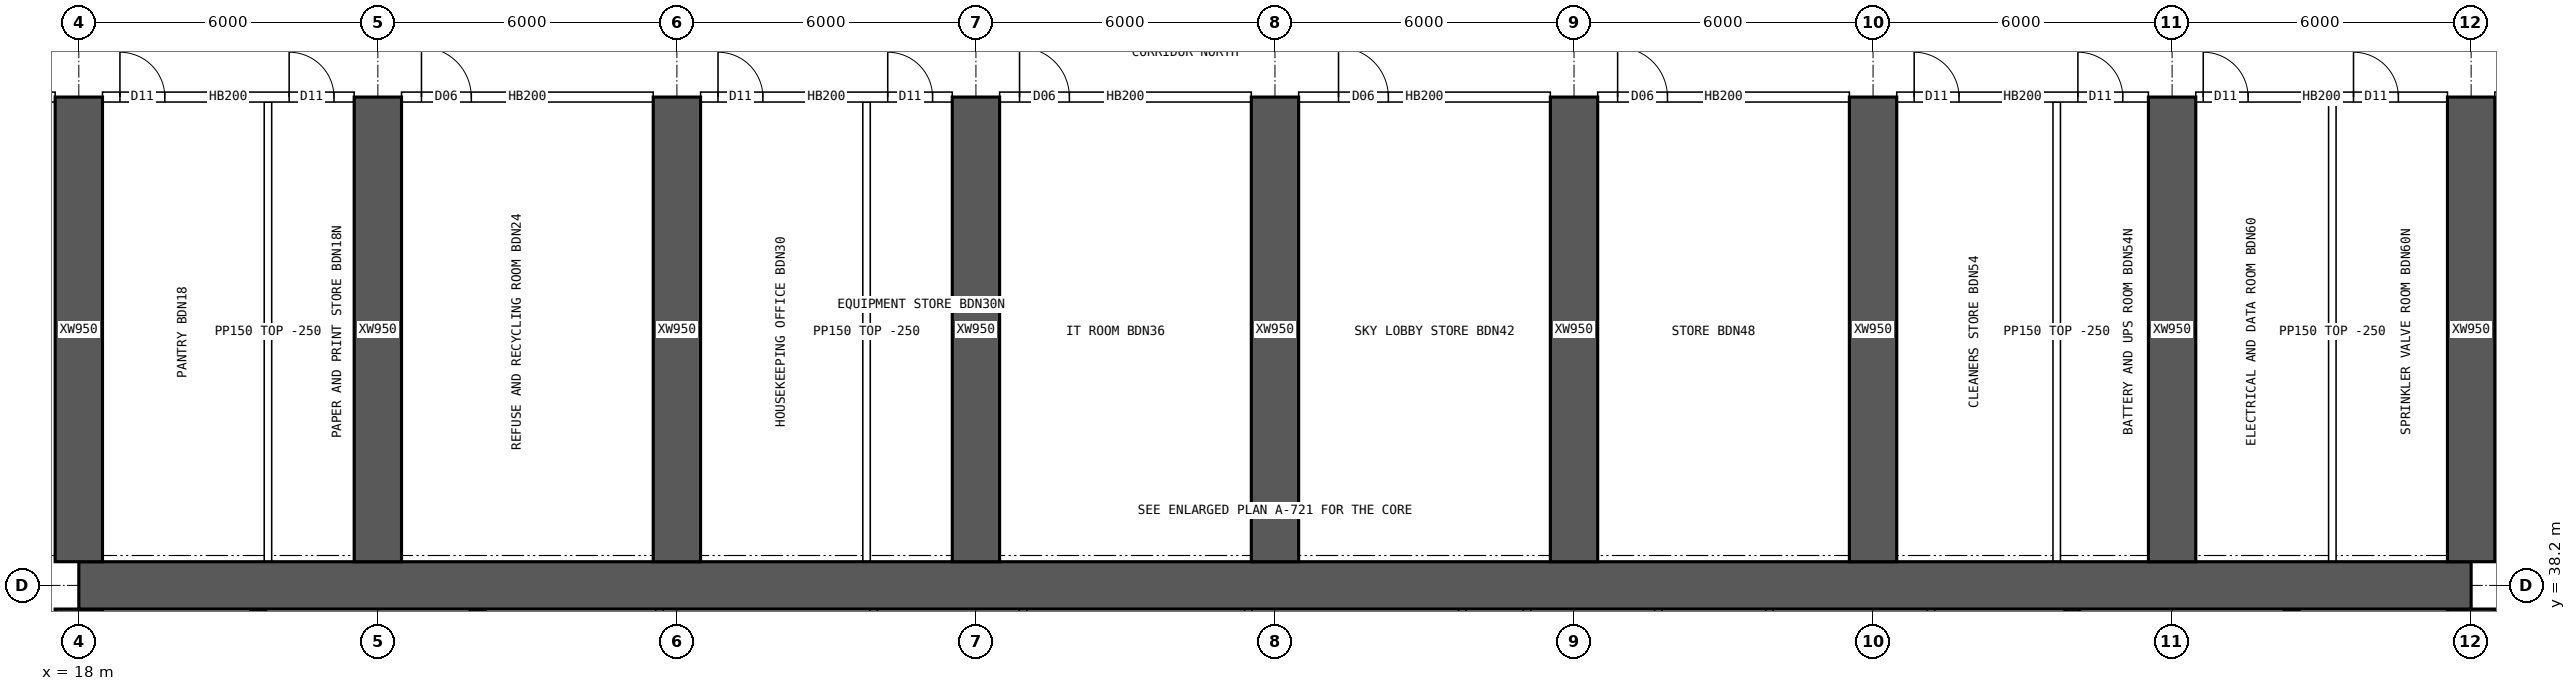
"""IFC4 building model, lengths in metres.
Left out: names, types, materials, properties, quantities, classifications, styles, units other than length and angle.
Written with IfcOpenShell. Run it as: python <this file> out.ifc"""

import sys

from ifc_helpers import new_model, si_unit, direction, frame, frame_2d, origin, place, context, subcontext, project, spatial, rectangle, extrude, element, fill, save


model = new_model("IFC4")
c1 = context("Model", 3, precision=1e-05, world=origin(), true_north=direction((0.0, 1.0)))
c2 = subcontext(c1, "Body", "Model", "MODEL_VIEW")
j1 = project(units=[si_unit("LENGTHUNIT", "METRE"), si_unit("PLANEANGLEUNIT", "RADIAN")], contexts=[c1])
p1 = place(None, origin())
s1 = spatial("IfcSite", under=j1, at=p1, CompositionType="ELEMENT")
p2 = place(p1, origin())
s2 = spatial("IfcBuilding", under=s1, at=p2, CompositionType="ELEMENT")
p3 = place(p2, frame((0.0, 0.0, 76.15)))
s3 = spatial("IfcBuildingStorey", under=s2, at=p3, CompositionType="ELEMENT", Elevation=76.15)
p4 = place(p3, frame((18.0, 38.2, 0.0), z_axis=(0.0, 0.0, 1.0), x_axis=(1.0, 0.0, 0.0)))
e1 = element("IfcWall", 1, at=p4, inside=s3, PredefinedType="SHEAR", context=c2, shape_type="SweptSolid", body=[
    extrude(rectangle(XDim=48.0, YDim=0.95, at=frame_2d((24.0, 0.0))), origin(), (0.0, 0.0, 1.0), 4.5),
])
p5 = place(p3, frame((18.0, 26.275, 0.0), z_axis=(0.0, 0.0, 1.0), x_axis=(0.0, 1.0, 0.0)))
e2 = element("IfcWall", 2, at=p5, inside=s3, PredefinedType="SHEAR", context=c2, shape_type="SweptSolid", body=[
    extrude(rectangle(XDim=11.45, YDim=0.95, at=frame_2d((5.725, 0.0))), origin(), (0.0, 0.0, 1.0), 4.5),
])
p6 = place(p5, frame((5.025, 0.0, 0.0)))
e3 = element("IfcOpeningElement", 3, at=p6, cuts=e2, PredefinedType="OPENING", context=c2, shape_type="SweptSolid", body=[
    extrude(rectangle(XDim=1.2, YDim=2.1, at=frame_2d((0.6, 1.05))), frame((0.0, 0.485, 0.0), z_axis=(0.0, -1.0, 0.0), x_axis=(1.0, 0.0, 0.0)), (0.0, 0.0, 1.0), 0.97),
])
p7 = place(p3, frame((66.0, 26.275, 0.0), z_axis=(0.0, 0.0, 1.0), x_axis=(0.0, 1.0, 0.0)))
e4 = element("IfcWall", 4, at=p7, inside=s3, PredefinedType="SHEAR", context=c2, shape_type="SweptSolid", body=[
    extrude(rectangle(XDim=11.45, YDim=0.95, at=frame_2d((5.725, 0.0))), origin(), (0.0, 0.0, 1.0), 4.5),
])
p8 = place(p7, frame((5.025, 0.0, 0.0)))
e5 = element("IfcOpeningElement", 5, at=p8, cuts=e4, PredefinedType="OPENING", context=c2, shape_type="SweptSolid", body=[
    extrude(rectangle(XDim=1.2, YDim=2.1, at=frame_2d((0.6, 1.05))), frame((0.0, 0.485, 0.0), z_axis=(0.0, -1.0, 0.0), x_axis=(1.0, 0.0, 0.0)), (0.0, 0.0, 1.0), 0.97),
])
for number, where, z_axis, x_axis in (
    (6, (21.6, 34.75, 0.0), (0.0, 0.0, 1.0), (0.0, 1.0, 0.0)),
    (7, (62.4, 34.75, 0.0), (0.0, 0.0, 1.0), (0.0, 1.0, 0.0)),
    (8, (26.0, 34.75, 0.0), (0.0, 0.0, 1.0), (0.0, 1.0, 0.0)),
    (9, (58.0, 34.75, 0.0), (0.0, 0.0, 1.0), (0.0, 1.0, 0.0)),
):
    element("IfcWall", number, at=place(p3, frame(where, z_axis=z_axis, x_axis=x_axis)), inside=s3, PredefinedType="SHEAR", context=c2, shape_type="SweptSolid", body=[
        extrude(rectangle(XDim=2.975, YDim=0.3, at=frame_2d((1.488, 0.0))), origin(), (0.0, 0.0, 1.0), 4.5),
    ])
for number, where, z_axis, x_axis in (
    (10, (18.0, 38.675, 0.0), (0.0, 0.0, 1.0), (0.0, 1.0, 0.0)),
    (11, (24.0, 38.675, 0.0), (0.0, 0.0, 1.0), (0.0, 1.0, 0.0)),
    (12, (30.0, 38.675, 0.0), (0.0, 0.0, 1.0), (0.0, 1.0, 0.0)),
    (13, (36.0, 38.675, 0.0), (0.0, 0.0, 1.0), (0.0, 1.0, 0.0)),
    (14, (42.0, 38.675, 0.0), (0.0, 0.0, 1.0), (0.0, 1.0, 0.0)),
    (15, (48.0, 38.675, 0.0), (0.0, 0.0, 1.0), (0.0, 1.0, 0.0)),
    (16, (54.0, 38.675, 0.0), (0.0, 0.0, 1.0), (0.0, 1.0, 0.0)),
    (17, (60.0, 38.675, 0.0), (0.0, 0.0, 1.0), (0.0, 1.0, 0.0)),
    (18, (66.0, 38.675, 0.0), (0.0, 0.0, 1.0), (0.0, 1.0, 0.0)),
):
    element("IfcWall", number, at=place(p3, frame(where, z_axis=z_axis, x_axis=x_axis)), inside=s3, PredefinedType="SHEAR", context=c2, shape_type="SweptSolid", body=[
        extrude(rectangle(XDim=9.325, YDim=0.95, at=frame_2d((4.663, 0.0))), origin(), (0.0, 0.0, 1.0), 4.5),
    ])
for number, where, z_axis, x_axis in (
    (19, (29.651, 34.75, 0.0), (0.0, 0.0, 1.0), (0.0, 1.0, 0.0)),
    (20, (33.946, 34.75, 0.0), (0.0, 0.0, 1.0), (0.0, 1.0, 0.0)),
    (21, (36.946, 34.75, 0.0), (0.0, 0.0, 1.0), (0.0, 1.0, 0.0)),
    (22, (41.463, 34.75, 0.0), (0.0, 0.0, 1.0), (0.0, 1.0, 0.0)),
    (23, (45.758, 34.75, 0.0), (0.0, 0.0, 1.0), (0.0, 1.0, 0.0)),
    (24, (47.058, 34.75, 0.0), (0.0, 0.0, 1.0), (0.0, 1.0, 0.0)),
    (25, (49.692, 34.75, 0.0), (0.0, 0.0, 1.0), (0.0, 1.0, 0.0)),
    (26, (51.921, 34.75, 0.0), (0.0, 0.0, 1.0), (0.0, 1.0, 0.0)),
    (27, (55.163, 34.75, 0.0), (0.0, 0.0, 1.0), (0.0, 1.0, 0.0)),
):
    element("IfcWall", number, at=place(p3, frame(where, z_axis=z_axis, x_axis=x_axis)), inside=s3, PredefinedType="SOLIDWALL", context=c2, shape_type="SweptSolid", body=[
        extrude(rectangle(XDim=2.975, YDim=0.15, at=frame_2d((1.488, 0.0))), origin(), (0.0, 0.0, 1.0), 4.25),
    ])
p9 = place(p3, frame((12.475, 48.0, 0.0), z_axis=(0.0, 0.0, 1.0), x_axis=(1.0, 0.0, 0.0)))
e28 = element("IfcWall", 28, at=p9, inside=s3, PredefinedType="SOLIDWALL", context=c2, shape_type="SweptSolid", body=[
    extrude(rectangle(XDim=5.05, YDim=0.2, at=frame_2d((2.525, 0.0))), origin(), (0.0, 0.0, 1.0), 4.25),
])
p10 = place(p9, frame((3.325, 0.0, 0.0)))
e29 = element("IfcOpeningElement", 29, at=p10, cuts=e28, PredefinedType="OPENING", context=c2, shape_type="SweptSolid", body=[
    extrude(rectangle(XDim=1.6, YDim=2.1, at=frame_2d((0.8, 1.05))), frame((0.0, 0.11, 0.0), z_axis=(0.0, -1.0, 0.0), x_axis=(1.0, 0.0, 0.0)), (0.0, 0.0, 1.0), 0.22),
])
p11 = place(p3, frame((18.475, 48.0, 0.0), z_axis=(0.0, 0.0, 1.0), x_axis=(1.0, 0.0, 0.0)))
e30 = element("IfcWall", 30, at=p11, inside=s3, PredefinedType="SOLIDWALL", context=c2, shape_type="SweptSolid", body=[
    extrude(rectangle(XDim=5.05, YDim=0.2, at=frame_2d((2.525, 0.0))), origin(), (0.0, 0.0, 1.0), 4.25),
])
p12 = place(p11, frame((0.35, 0.0, 0.0)))
e31 = element("IfcOpeningElement", 31, at=p12, cuts=e30, PredefinedType="OPENING", context=c2, shape_type="SweptSolid", body=[
    extrude(rectangle(XDim=0.9, YDim=2.1, at=frame_2d((0.45, 1.05))), frame((0.0, 0.11, 0.0), z_axis=(0.0, -1.0, 0.0), x_axis=(1.0, 0.0, 0.0)), (0.0, 0.0, 1.0), 0.22),
])
p13 = place(p11, frame((3.745, 0.0, 0.0)))
e32 = element("IfcOpeningElement", 32, at=p13, cuts=e30, PredefinedType="OPENING", context=c2, shape_type="SweptSolid", body=[
    extrude(rectangle(XDim=0.9, YDim=2.1, at=frame_2d((0.45, 1.05))), frame((0.0, 0.11, 0.0), z_axis=(0.0, -1.0, 0.0), x_axis=(1.0, 0.0, 0.0)), (0.0, 0.0, 1.0), 0.22),
])
p14 = place(p3, frame((24.475, 48.0, 0.0), z_axis=(0.0, 0.0, 1.0), x_axis=(1.0, 0.0, 0.0)))
e33 = element("IfcWall", 33, at=p14, inside=s3, PredefinedType="SOLIDWALL", context=c2, shape_type="SweptSolid", body=[
    extrude(rectangle(XDim=5.05, YDim=0.2, at=frame_2d((2.525, 0.0))), origin(), (0.0, 0.0, 1.0), 4.25),
])
p15 = place(p14, frame((0.4, 0.0, 0.0)))
e34 = element("IfcOpeningElement", 34, at=p15, cuts=e33, PredefinedType="OPENING", context=c2, shape_type="SweptSolid", body=[
    extrude(rectangle(XDim=1.0, YDim=2.1, at=frame_2d((0.5, 1.05))), frame((0.0, 0.11, 0.0), z_axis=(0.0, -1.0, 0.0), x_axis=(1.0, 0.0, 0.0)), (0.0, 0.0, 1.0), 0.22),
])
p16 = place(p3, frame((30.475, 48.0, 0.0), z_axis=(0.0, 0.0, 1.0), x_axis=(1.0, 0.0, 0.0)))
e35 = element("IfcWall", 35, at=p16, inside=s3, PredefinedType="SOLIDWALL", context=c2, shape_type="SweptSolid", body=[
    extrude(rectangle(XDim=5.05, YDim=0.2, at=frame_2d((2.525, 0.0))), origin(), (0.0, 0.0, 1.0), 4.25),
])
p17 = place(p16, frame((0.35, 0.0, 0.0)))
e36 = element("IfcOpeningElement", 36, at=p17, cuts=e35, PredefinedType="OPENING", context=c2, shape_type="SweptSolid", body=[
    extrude(rectangle(XDim=0.9, YDim=2.1, at=frame_2d((0.45, 1.05))), frame((0.0, 0.11, 0.0), z_axis=(0.0, -1.0, 0.0), x_axis=(1.0, 0.0, 0.0)), (0.0, 0.0, 1.0), 0.22),
])
p18 = place(p16, frame((3.755, 0.0, 0.0)))
e37 = element("IfcOpeningElement", 37, at=p18, cuts=e35, PredefinedType="OPENING", context=c2, shape_type="SweptSolid", body=[
    extrude(rectangle(XDim=0.9, YDim=2.1, at=frame_2d((0.45, 1.05))), frame((0.0, 0.11, 0.0), z_axis=(0.0, -1.0, 0.0), x_axis=(1.0, 0.0, 0.0)), (0.0, 0.0, 1.0), 0.22),
])
p19 = place(p3, frame((36.475, 48.0, 0.0), z_axis=(0.0, 0.0, 1.0), x_axis=(1.0, 0.0, 0.0)))
e38 = element("IfcWall", 38, at=p19, inside=s3, PredefinedType="SOLIDWALL", context=c2, shape_type="SweptSolid", body=[
    extrude(rectangle(XDim=5.05, YDim=0.2, at=frame_2d((2.525, 0.0))), origin(), (0.0, 0.0, 1.0), 4.25),
])
p20 = place(p19, frame((0.4, 0.0, 0.0)))
e39 = element("IfcOpeningElement", 39, at=p20, cuts=e38, PredefinedType="OPENING", context=c2, shape_type="SweptSolid", body=[
    extrude(rectangle(XDim=1.0, YDim=2.1, at=frame_2d((0.5, 1.05))), frame((0.0, 0.11, 0.0), z_axis=(0.0, -1.0, 0.0), x_axis=(1.0, 0.0, 0.0)), (0.0, 0.0, 1.0), 0.22),
])
p21 = place(p3, frame((42.475, 48.0, 0.0), z_axis=(0.0, 0.0, 1.0), x_axis=(1.0, 0.0, 0.0)))
e40 = element("IfcWall", 40, at=p21, inside=s3, PredefinedType="SOLIDWALL", context=c2, shape_type="SweptSolid", body=[
    extrude(rectangle(XDim=5.05, YDim=0.2, at=frame_2d((2.525, 0.0))), origin(), (0.0, 0.0, 1.0), 4.25),
])
p22 = place(p21, frame((0.8, 0.0, 0.0)))
e41 = element("IfcOpeningElement", 41, at=p22, cuts=e40, PredefinedType="OPENING", context=c2, shape_type="SweptSolid", body=[
    extrude(rectangle(XDim=1.0, YDim=2.1, at=frame_2d((0.5, 1.05))), frame((0.0, 0.11, 0.0), z_axis=(0.0, -1.0, 0.0), x_axis=(1.0, 0.0, 0.0)), (0.0, 0.0, 1.0), 0.22),
])
p23 = place(p3, frame((48.475, 48.0, 0.0), z_axis=(0.0, 0.0, 1.0), x_axis=(1.0, 0.0, 0.0)))
e42 = element("IfcWall", 42, at=p23, inside=s3, PredefinedType="SOLIDWALL", context=c2, shape_type="SweptSolid", body=[
    extrude(rectangle(XDim=5.05, YDim=0.2, at=frame_2d((2.525, 0.0))), origin(), (0.0, 0.0, 1.0), 4.25),
])
p24 = place(p23, frame((0.4, 0.0, 0.0)))
e43 = element("IfcOpeningElement", 43, at=p24, cuts=e42, PredefinedType="OPENING", context=c2, shape_type="SweptSolid", body=[
    extrude(rectangle(XDim=1.0, YDim=2.1, at=frame_2d((0.5, 1.05))), frame((0.0, 0.11, 0.0), z_axis=(0.0, -1.0, 0.0), x_axis=(1.0, 0.0, 0.0)), (0.0, 0.0, 1.0), 0.22),
])
p25 = place(p3, frame((54.475, 48.0, 0.0), z_axis=(0.0, 0.0, 1.0), x_axis=(1.0, 0.0, 0.0)))
e44 = element("IfcWall", 44, at=p25, inside=s3, PredefinedType="SOLIDWALL", context=c2, shape_type="SweptSolid", body=[
    extrude(rectangle(XDim=5.05, YDim=0.2, at=frame_2d((2.525, 0.0))), origin(), (0.0, 0.0, 1.0), 4.25),
])
p26 = place(p25, frame((0.35, 0.0, 0.0)))
e45 = element("IfcOpeningElement", 45, at=p26, cuts=e44, PredefinedType="OPENING", context=c2, shape_type="SweptSolid", body=[
    extrude(rectangle(XDim=0.9, YDim=2.1, at=frame_2d((0.45, 1.05))), frame((0.0, 0.11, 0.0), z_axis=(0.0, -1.0, 0.0), x_axis=(1.0, 0.0, 0.0)), (0.0, 0.0, 1.0), 0.22),
])
p27 = place(p25, frame((3.635, 0.0, 0.0)))
e46 = element("IfcOpeningElement", 46, at=p27, cuts=e44, PredefinedType="OPENING", context=c2, shape_type="SweptSolid", body=[
    extrude(rectangle(XDim=0.9, YDim=2.1, at=frame_2d((0.45, 1.05))), frame((0.0, 0.11, 0.0), z_axis=(0.0, -1.0, 0.0), x_axis=(1.0, 0.0, 0.0)), (0.0, 0.0, 1.0), 0.22),
])
p28 = place(p3, frame((60.475, 48.0, 0.0), z_axis=(0.0, 0.0, 1.0), x_axis=(1.0, 0.0, 0.0)))
e47 = element("IfcWall", 47, at=p28, inside=s3, PredefinedType="SOLIDWALL", context=c2, shape_type="SweptSolid", body=[
    extrude(rectangle(XDim=5.05, YDim=0.2, at=frame_2d((2.525, 0.0))), origin(), (0.0, 0.0, 1.0), 4.25),
])
p29 = place(p28, frame((0.15, 0.0, 0.0)))
e48 = element("IfcOpeningElement", 48, at=p29, cuts=e47, PredefinedType="OPENING", context=c2, shape_type="SweptSolid", body=[
    extrude(rectangle(XDim=0.9, YDim=2.1, at=frame_2d((0.45, 1.05))), frame((0.0, 0.11, 0.0), z_axis=(0.0, -1.0, 0.0), x_axis=(1.0, 0.0, 0.0)), (0.0, 0.0, 1.0), 0.22),
])
p30 = place(p28, frame((3.165, 0.0, 0.0)))
e49 = element("IfcOpeningElement", 49, at=p30, cuts=e47, PredefinedType="OPENING", context=c2, shape_type="SweptSolid", body=[
    extrude(rectangle(XDim=0.9, YDim=2.1, at=frame_2d((0.45, 1.05))), frame((0.0, 0.11, 0.0), z_axis=(0.0, -1.0, 0.0), x_axis=(1.0, 0.0, 0.0)), (0.0, 0.0, 1.0), 0.22),
])
p31 = place(p3, frame((66.475, 48.0, 0.0), z_axis=(0.0, 0.0, 1.0), x_axis=(1.0, 0.0, 0.0)))
e50 = element("IfcWall", 50, at=p31, inside=s3, PredefinedType="SOLIDWALL", context=c2, shape_type="SweptSolid", body=[
    extrude(rectangle(XDim=1.925, YDim=0.2, at=frame_2d((0.962, 0.0))), origin(), (0.0, 0.0, 1.0), 4.25),
])
p32 = place(p31, frame((0.05, 0.0, 0.0)))
e51 = element("IfcOpeningElement", 51, at=p32, cuts=e50, PredefinedType="OPENING", context=c2, shape_type="SweptSolid", body=[
    extrude(rectangle(XDim=1.2, YDim=2.1, at=frame_2d((0.6, 1.05))), frame((0.0, 0.11, 0.0), z_axis=(0.0, -1.0, 0.0), x_axis=(1.0, 0.0, 0.0)), (0.0, 0.0, 1.0), 0.22),
])
for number, where, z_axis, x_axis in (
    (52, (21.795, 38.675, 0.0), (0.0, 0.0, 1.0), (0.0, 1.0, 0.0)),
    (53, (33.805, 38.675, 0.0), (0.0, 0.0, 1.0), (0.0, 1.0, 0.0)),
    (54, (57.685, 38.675, 0.0), (0.0, 0.0, 1.0), (0.0, 1.0, 0.0)),
    (55, (63.215, 38.675, 0.0), (0.0, 0.0, 1.0), (0.0, 1.0, 0.0)),
):
    element("IfcWall", number, at=place(p3, frame(where, z_axis=z_axis, x_axis=x_axis)), inside=s3, PredefinedType="PARTITIONING", context=c2, shape_type="SweptSolid", body=[
        extrude(rectangle(XDim=9.225, YDim=0.15, at=frame_2d((4.612, 0.0))), origin(), (0.0, 0.0, 1.0), 4.25),
    ])
p33 = place(p12, origin())
e56 = element("IfcDoor", 56, at=p33, inside=s3, OperationType="SINGLE_SWING_LEFT", PredefinedType="DOOR", context=c2, shape_type="SweptSolid", body=[
    extrude(rectangle(XDim=0.9, YDim=2.1, at=frame_2d((0.45, 1.05))), frame((0.0, 0.025, 0.0), z_axis=(0.0, -1.0, 0.0), x_axis=(1.0, 0.0, 0.0)), (0.0, 0.0, 1.0), 0.05),
])
fill(e31, e56)
p34 = place(p13, origin())
e57 = element("IfcDoor", 57, at=p34, inside=s3, OperationType="SINGLE_SWING_LEFT", PredefinedType="DOOR", context=c2, shape_type="SweptSolid", body=[
    extrude(rectangle(XDim=0.9, YDim=2.1, at=frame_2d((0.45, 1.05))), frame((0.0, 0.025, 0.0), z_axis=(0.0, -1.0, 0.0), x_axis=(1.0, 0.0, 0.0)), (0.0, 0.0, 1.0), 0.05),
])
fill(e32, e57)
p35 = place(p15, origin())
e58 = element("IfcDoor", 58, at=p35, inside=s3, OperationType="SINGLE_SWING_LEFT", PredefinedType="DOOR", context=c2, shape_type="SweptSolid", body=[
    extrude(rectangle(XDim=1.0, YDim=2.1, at=frame_2d((0.5, 1.05))), frame((0.0, 0.025, 0.0), z_axis=(0.0, -1.0, 0.0), x_axis=(1.0, 0.0, 0.0)), (0.0, 0.0, 1.0), 0.05),
])
fill(e34, e58)
p36 = place(p17, origin())
e59 = element("IfcDoor", 59, at=p36, inside=s3, OperationType="SINGLE_SWING_LEFT", PredefinedType="DOOR", context=c2, shape_type="SweptSolid", body=[
    extrude(rectangle(XDim=0.9, YDim=2.1, at=frame_2d((0.45, 1.05))), frame((0.0, 0.025, 0.0), z_axis=(0.0, -1.0, 0.0), x_axis=(1.0, 0.0, 0.0)), (0.0, 0.0, 1.0), 0.05),
])
fill(e36, e59)
p37 = place(p18, origin())
e60 = element("IfcDoor", 60, at=p37, inside=s3, OperationType="SINGLE_SWING_LEFT", PredefinedType="DOOR", context=c2, shape_type="SweptSolid", body=[
    extrude(rectangle(XDim=0.9, YDim=2.1, at=frame_2d((0.45, 1.05))), frame((0.0, 0.025, 0.0), z_axis=(0.0, -1.0, 0.0), x_axis=(1.0, 0.0, 0.0)), (0.0, 0.0, 1.0), 0.05),
])
fill(e37, e60)
p38 = place(p20, origin())
e61 = element("IfcDoor", 61, at=p38, inside=s3, OperationType="SINGLE_SWING_LEFT", PredefinedType="DOOR", context=c2, shape_type="SweptSolid", body=[
    extrude(rectangle(XDim=1.0, YDim=2.1, at=frame_2d((0.5, 1.05))), frame((0.0, 0.025, 0.0), z_axis=(0.0, -1.0, 0.0), x_axis=(1.0, 0.0, 0.0)), (0.0, 0.0, 1.0), 0.05),
])
fill(e39, e61)
p39 = place(p22, origin())
e62 = element("IfcDoor", 62, at=p39, inside=s3, OperationType="SINGLE_SWING_LEFT", PredefinedType="DOOR", context=c2, shape_type="SweptSolid", body=[
    extrude(rectangle(XDim=1.0, YDim=2.1, at=frame_2d((0.5, 1.05))), frame((0.0, 0.025, 0.0), z_axis=(0.0, -1.0, 0.0), x_axis=(1.0, 0.0, 0.0)), (0.0, 0.0, 1.0), 0.05),
])
fill(e41, e62)
p40 = place(p24, origin())
e63 = element("IfcDoor", 63, at=p40, inside=s3, OperationType="SINGLE_SWING_LEFT", PredefinedType="DOOR", context=c2, shape_type="SweptSolid", body=[
    extrude(rectangle(XDim=1.0, YDim=2.1, at=frame_2d((0.5, 1.05))), frame((0.0, 0.025, 0.0), z_axis=(0.0, -1.0, 0.0), x_axis=(1.0, 0.0, 0.0)), (0.0, 0.0, 1.0), 0.05),
])
fill(e43, e63)
p41 = place(p26, origin())
e64 = element("IfcDoor", 64, at=p41, inside=s3, OperationType="SINGLE_SWING_LEFT", PredefinedType="DOOR", context=c2, shape_type="SweptSolid", body=[
    extrude(rectangle(XDim=0.9, YDim=2.1, at=frame_2d((0.45, 1.05))), frame((0.0, 0.025, 0.0), z_axis=(0.0, -1.0, 0.0), x_axis=(1.0, 0.0, 0.0)), (0.0, 0.0, 1.0), 0.05),
])
fill(e45, e64)
p42 = place(p27, origin())
e65 = element("IfcDoor", 65, at=p42, inside=s3, OperationType="SINGLE_SWING_LEFT", PredefinedType="DOOR", context=c2, shape_type="SweptSolid", body=[
    extrude(rectangle(XDim=0.9, YDim=2.1, at=frame_2d((0.45, 1.05))), frame((0.0, 0.025, 0.0), z_axis=(0.0, -1.0, 0.0), x_axis=(1.0, 0.0, 0.0)), (0.0, 0.0, 1.0), 0.05),
])
fill(e46, e65)
p43 = place(p29, origin())
e66 = element("IfcDoor", 66, at=p43, inside=s3, OperationType="SINGLE_SWING_LEFT", PredefinedType="DOOR", context=c2, shape_type="SweptSolid", body=[
    extrude(rectangle(XDim=0.9, YDim=2.1, at=frame_2d((0.45, 1.05))), frame((0.0, 0.025, 0.0), z_axis=(0.0, -1.0, 0.0), x_axis=(1.0, 0.0, 0.0)), (0.0, 0.0, 1.0), 0.05),
])
fill(e48, e66)
p44 = place(p30, origin())
e67 = element("IfcDoor", 67, at=p44, inside=s3, OperationType="SINGLE_SWING_LEFT", PredefinedType="DOOR", context=c2, shape_type="SweptSolid", body=[
    extrude(rectangle(XDim=0.9, YDim=2.1, at=frame_2d((0.45, 1.05))), frame((0.0, 0.025, 0.0), z_axis=(0.0, -1.0, 0.0), x_axis=(1.0, 0.0, 0.0)), (0.0, 0.0, 1.0), 0.05),
])
fill(e49, e67)
save(model, sys.argv[1])
